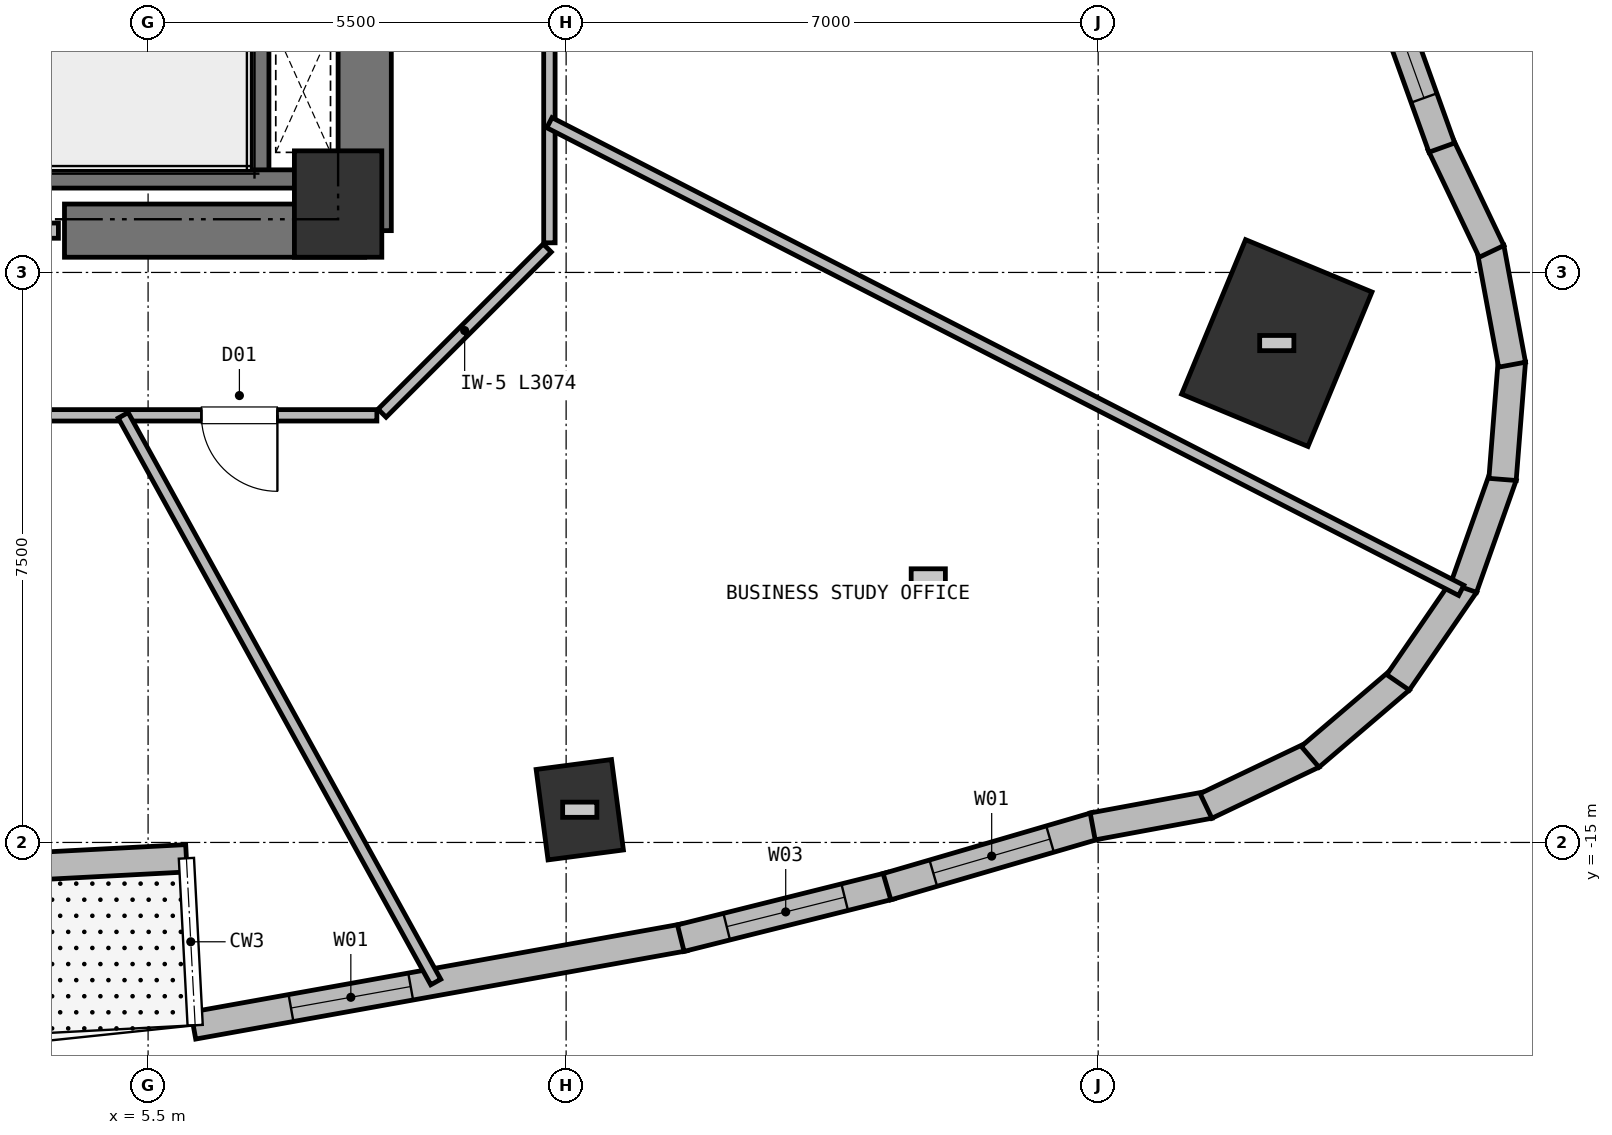
"""IFC4 building model, lengths in metres.
Left out: names, types, materials, properties, quantities, classifications, styles, units other than length and angle.
Written with IfcOpenShell. Run it as: python <this file> out.ifc"""

import sys

from ifc_helpers import new_model, si_unit, direction, frame, frame_2d, origin, origin_2d, place, context, subcontext, project, spatial, rectangle, extrude, element, fill, save


model = new_model("IFC4")
c1 = context("Model", 3, precision=1e-05, world=origin(), true_north=direction((0.0, 1.0)))
c2 = subcontext(c1, "Body", "Model", "MODEL_VIEW")
j1 = project(units=[si_unit("LENGTHUNIT", "METRE"), si_unit("PLANEANGLEUNIT", "RADIAN")], contexts=[c1])
p1 = place(None, origin())
s1 = spatial("IfcSite", under=j1, at=p1, CompositionType="ELEMENT")
p2 = place(p1, origin())
s2 = spatial("IfcBuilding", under=s1, at=p2, CompositionType="ELEMENT")
p3 = place(p2, frame((0.0, 0.0, 41.75)))
s3 = spatial("IfcBuildingStorey", under=s2, at=p3, CompositionType="ELEMENT", Elevation=41.75)
p4 = place(p3, frame((8.0, -6.6, 0.0), z_axis=(0.0, 0.0, 1.0), x_axis=(1.0, 0.0, 0.0)))
e1 = element("IfcColumn", 1, at=p4, inside=s3, PredefinedType="COLUMN", context=c2, shape_type="SweptSolid", body=[
    extrude(rectangle(XDim=1.15, YDim=1.4, at=origin_2d()), origin(), (0.0, 0.0, 1.0), 3.75),
])
p5 = place(p3, frame((4.4, -6.95, 0.0), z_axis=(0.0, 0.0, 1.0), x_axis=(1.0, 0.0, 0.0)))
e2 = element("IfcWall", 2, at=p5, inside=s3, PredefinedType="SHEAR", context=c2, shape_type="SweptSolid", body=[
    extrude(rectangle(XDim=3.95, YDim=0.7, at=frame_2d((1.975, 0.0))), origin(), (0.0, 0.0, 1.0), 3.5),
])
p6 = place(p3, frame((8.35, -6.95, 0.0), z_axis=(0.0, 0.0, 1.0), x_axis=(0.0, 1.0, 0.0)))
e3 = element("IfcWall", 3, at=p6, inside=s3, PredefinedType="SHEAR", context=c2, shape_type="SweptSolid", body=[
    extrude(rectangle(XDim=8.1, YDim=0.7, at=frame_2d((4.05, 0.0))), origin(), (0.0, 0.0, 1.0), 3.5),
])
p7 = place(p3, frame((11.179, -14.569, 0.0), z_axis=(0.0, 0.0, 1.0), x_axis=(0.991444861374, 0.13052619222, 0.0)))
e4 = element("IfcColumn", 4, at=p7, inside=s3, PredefinedType="COLUMN", context=c2, shape_type="SweptSolid", body=[
    extrude(rectangle(XDim=1.0, YDim=1.2, at=origin_2d()), origin(), (0.0, 0.0, 1.0), 3.75),
])
p8 = place(p3, frame((20.35, -8.429, 0.0), z_axis=(0.0, 0.0, 1.0), x_axis=(-0.923879532511, 0.382683432365, 0.0)))
e5 = element("IfcColumn", 5, at=p8, inside=s3, PredefinedType="COLUMN", context=c2, shape_type="SweptSolid", body=[
    extrude(rectangle(XDim=1.8, YDim=2.2, at=origin_2d()), origin(), (0.0, 0.0, 1.0), 3.75),
])
p9 = place(p3, frame((6.004, -15.208, 0.0), z_axis=(0.0, 0.0, 1.0), x_axis=(-0.998630058509, -0.052325961458, 0.0)))
e6 = element("IfcWall", 6, at=p9, inside=s3, PredefinedType="SOLIDWALL", context=c2, shape_type="SweptSolid", body=[
    extrude(rectangle(XDim=10.4, YDim=0.36, at=frame_2d((5.2, 0.0))), origin(), (0.0, 0.0, 1.0), 3.5),
])
p10 = place(p9, frame((5.0, 0.0, 0.0)))
e7 = element("IfcOpeningElement", 7, at=p10, cuts=e6, PredefinedType="OPENING", context=c2, shape_type="SweptSolid", body=[
    extrude(rectangle(XDim=1.65, YDim=2.25, at=frame_2d((0.825, 1.125))), frame((0.0, 0.19, 0.0), z_axis=(0.0, -1.0, 0.0), x_axis=(1.0, 0.0, 0.0)), (0.0, 0.0, 1.0), 0.38),
])
p11 = place(p3, frame((12.557, -16.249, 0.0), z_axis=(0.0, 0.0, 1.0), x_axis=(-0.984232555833, -0.176879269667, 0.0)))
e8 = element("IfcWall", 8, at=p11, inside=s3, PredefinedType="SOLIDWALL", context=c2, shape_type="SweptSolid", body=[
    extrude(rectangle(XDim=6.566, YDim=0.36, at=frame_2d((3.283, 0.0))), origin(), (0.0, 0.0, 1.0), 3.5),
])
p12 = place(p11, frame((3.66, 0.0, 0.72)))
e9 = element("IfcOpeningElement", 9, at=p12, cuts=e8, PredefinedType="OPENING", context=c2, shape_type="SweptSolid", body=[
    extrude(rectangle(XDim=1.6, YDim=1.88, at=frame_2d((0.8, 0.94))), frame((0.0, 0.19, 0.0), z_axis=(0.0, -1.0, 0.0), x_axis=(1.0, 0.0, 0.0)), (0.0, 0.0, 1.0), 0.38),
])
p13 = place(p3, frame((15.27, -15.569, 0.0), z_axis=(0.0, 0.0, 1.0), x_axis=(-0.970177808132, -0.242394349375, 0.0)))
e10 = element("IfcWall", 10, at=p13, inside=s3, PredefinedType="SOLIDWALL", context=c2, shape_type="SweptSolid", body=[
    extrude(rectangle(XDim=2.846, YDim=0.36, at=frame_2d((1.423, 0.0))), origin(), (0.0, 0.0, 1.0), 3.5),
])
p14 = place(p13, frame((0.623, 0.0, 0.72)))
e11 = element("IfcOpeningElement", 11, at=p14, cuts=e10, PredefinedType="OPENING", context=c2, shape_type="SweptSolid", body=[
    extrude(rectangle(XDim=1.6, YDim=1.88, at=frame_2d((0.8, 0.94))), frame((0.0, 0.19, 0.0), z_axis=(0.0, -1.0, 0.0), x_axis=(1.0, 0.0, 0.0)), (0.0, 0.0, 1.0), 0.38),
])
p15 = place(p3, frame((17.977, -14.778, 0.0), z_axis=(0.0, 0.0, 1.0), x_axis=(-0.959918981308, -0.280277629013, 0.0)))
e12 = element("IfcWall", 12, at=p15, inside=s3, PredefinedType="SOLIDWALL", context=c2, shape_type="SweptSolid", body=[
    extrude(rectangle(XDim=2.87, YDim=0.36, at=frame_2d((1.435, 0.0))), origin(), (0.0, 0.0, 1.0), 3.5),
])
p16 = place(p15, frame((0.635, 0.0, 0.72)))
e13 = element("IfcOpeningElement", 13, at=p16, cuts=e12, PredefinedType="OPENING", context=c2, shape_type="SweptSolid", body=[
    extrude(rectangle(XDim=1.6, YDim=1.88, at=frame_2d((0.8, 0.94))), frame((0.0, 0.19, 0.0), z_axis=(0.0, -1.0, 0.0), x_axis=(1.0, 0.0, 0.0)), (0.0, 0.0, 1.0), 0.38),
])
for number, where, z_axis, x_axis in (
    (14, (19.466, -14.504, 0.0), (0.0, 0.0, 1.0), (-0.983, -0.182, 0.0)),
    (15, (20.83, -13.846, 0.0), (0.0, 0.0, 1.0), (-0.903, -0.431, 0.0)),
    (16, (21.978, -12.857, 0.0), (0.0, 0.0, 1.0), (-0.76, -0.649, 0.0)),
):
    element("IfcWall", number, at=place(p3, frame(where, z_axis=z_axis, x_axis=x_axis)), inside=s3, PredefinedType="SOLIDWALL", context=c2, shape_type="SweptSolid", body=[
        extrude(rectangle(XDim=1.564, YDim=0.36, at=frame_2d((0.782, 0.0))), origin(), (0.0, 0.0, 1.0), 3.5),
    ])
for number, where, z_axis, x_axis in (
    (17, (22.831, -11.605, 0.0), (0.0, 0.0, 1.0), (-0.566, -0.824, 0.0)),
    (18, (23.331, -10.175, 0.0), (0.0, 0.0, 1.0), (-0.334, -0.943, 0.0)),
    (19, (23.443, -8.664, 0.0), (0.0, 0.0, 1.0), (-0.079, -0.997, 0.0)),
):
    element("IfcWall", number, at=place(p3, frame(where, z_axis=z_axis, x_axis=x_axis)), inside=s3, PredefinedType="SOLIDWALL", context=c2, shape_type="SweptSolid", body=[
        extrude(rectangle(XDim=1.564, YDim=0.36, at=frame_2d((0.782, 0.0))), origin(), (0.0, 0.0, 1.0), 3.5),
    ])
p17 = place(p3, frame((23.16, -7.176, 0.0), z_axis=(0.0, 0.0, 1.0), x_axis=(0.182318428527, -0.983239538779, 0.0)))
e20 = element("IfcWall", 20, at=p17, inside=s3, PredefinedType="SOLIDWALL", context=c2, shape_type="SweptSolid", body=[
    extrude(rectangle(XDim=1.564, YDim=0.36, at=frame_2d((0.782, 0.0))), origin(), (0.0, 0.0, 1.0), 3.5),
])
p18 = place(p3, frame((22.502, -5.811, 0.0), z_axis=(0.0, 0.0, 1.0), x_axis=(0.430466656099, -0.902606480138, 0.0)))
e21 = element("IfcWall", 21, at=p18, inside=s3, PredefinedType="SOLIDWALL", context=c2, shape_type="SweptSolid", body=[
    extrude(rectangle(XDim=1.564, YDim=0.36, at=frame_2d((0.782, 0.0))), origin(), (0.0, 0.0, 1.0), 3.5),
])
p19 = place(p3, frame((21.511, -3.046, 0.0), z_axis=(0.0, 0.0, 1.0), x_axis=(0.338236051909, -0.941061301504, 0.0)))
e22 = element("IfcWall", 22, at=p19, inside=s3, PredefinedType="SOLIDWALL", context=c2, shape_type="SweptSolid", body=[
    extrude(rectangle(XDim=2.987, YDim=0.36, at=frame_2d((1.493, 0.0))), origin(), (0.0, 0.0, 1.0), 3.5),
])
p20 = place(p19, frame((0.694, 0.0, 0.72)))
e23 = element("IfcOpeningElement", 23, at=p20, cuts=e22, PredefinedType="OPENING", context=c2, shape_type="SweptSolid", body=[
    extrude(rectangle(XDim=1.6, YDim=1.88, at=frame_2d((0.8, 0.94))), frame((0.0, 0.19, 0.0), z_axis=(0.0, -1.0, 0.0), x_axis=(1.0, 0.0, 0.0)), (0.0, 0.0, 1.0), 0.38),
])
p21 = place(p3, frame((6.97, -6.16, 0.0), z_axis=(0.0, 0.0, 1.0), x_axis=(0.0, 1.0, 0.0)))
e24 = element("IfcWall", 24, at=p21, inside=s3, PredefinedType="SHEAR", context=c2, shape_type="SweptSolid", body=[
    extrude(rectangle(XDim=7.22, YDim=0.24, at=frame_2d((3.61, 0.0))), origin(), (0.0, 0.0, 1.0), 3.5),
])
p22 = place(p3, frame((4.01, -6.27, 0.0), z_axis=(0.0, 0.0, 1.0), x_axis=(1.0, 0.0, 0.0)))
e25 = element("IfcWall", 25, at=p22, inside=s3, PredefinedType="SHEAR", context=c2, shape_type="SweptSolid", body=[
    extrude(rectangle(XDim=3.415, YDim=0.24, at=frame_2d((1.708, 0.0))), origin(), (0.0, 0.0, 1.0), 3.5),
])
p23 = place(p3, frame((3.72, -6.95, 0.0), z_axis=(0.0, 0.0, 1.0), x_axis=(1.0, 0.0, 0.0)))
e26 = element("IfcWall", 26, at=p23, inside=s3, PredefinedType="PARTITIONING", context=c2, shape_type="SweptSolid", body=[
    extrude(rectangle(XDim=0.6, YDim=0.2, at=frame_2d((0.3, 0.0))), origin(), (0.0, 0.0, 1.0), 3.5),
])
p24 = place(p3, frame((8.51, -9.38, 0.0), z_axis=(0.0, 0.0, 1.0), x_axis=(-1.0, 0.0, 0.0)))
e27 = element("IfcWall", 27, at=p24, inside=s3, PredefinedType="PARTITIONING", context=c2, shape_type="SweptSolid", body=[
    extrude(rectangle(XDim=17.02, YDim=0.15, at=frame_2d((8.51, 0.0))), origin(), (0.0, 0.0, 1.0), 3.5),
])
p25 = place(p24, frame((7.448, 0.0, 0.0)))
e28 = element("IfcOpeningElement", 28, at=p25, cuts=e27, PredefinedType="OPENING", context=c2, shape_type="SweptSolid", body=[
    extrude(rectangle(XDim=1.0, YDim=2.15, at=frame_2d((0.5, 1.075))), frame((0.0, 0.085, 0.0), z_axis=(0.0, -1.0, 0.0), x_axis=(1.0, 0.0, 0.0)), (0.0, 0.0, 1.0), 0.17),
])
p26 = place(p24, frame((1.309, 0.0, 0.0)))
e29 = element("IfcOpeningElement", 29, at=p26, cuts=e27, PredefinedType="OPENING", context=c2, shape_type="SweptSolid", body=[
    extrude(rectangle(XDim=1.0, YDim=2.15, at=frame_2d((0.5, 1.075))), frame((0.0, 0.085, 0.0), z_axis=(0.0, -1.0, 0.0), x_axis=(1.0, 0.0, 0.0)), (0.0, 0.0, 1.0), 0.17),
])
p27 = place(p24, frame((14.164, 0.0, 0.0)))
e30 = element("IfcOpeningElement", 30, at=p27, cuts=e27, PredefinedType="OPENING", context=c2, shape_type="SweptSolid", body=[
    extrude(rectangle(XDim=1.06, YDim=2.15, at=frame_2d((0.53, 1.075))), frame((0.0, 0.085, 0.0), z_axis=(0.0, -1.0, 0.0), x_axis=(1.0, 0.0, 0.0)), (0.0, 0.0, 1.0), 0.17),
])
p28 = place(p3, frame((10.752, -7.178, 0.0), z_axis=(0.0, 0.0, 1.0), x_axis=(-0.707067066127, -0.707146494016, 0.0)))
e31 = element("IfcWall", 31, at=p28, inside=s3, PredefinedType="PARTITIONING", context=c2, shape_type="SweptSolid", body=[
    extrude(rectangle(XDim=3.074, YDim=0.15, at=frame_2d((1.537, 0.0))), origin(), (0.0, 0.0, 1.0), 3.12),
])
p29 = place(p3, frame((10.78, 7.11, 0.0), z_axis=(0.0, 0.0, 1.0), x_axis=(0.0, -1.0, 0.0)))
e32 = element("IfcWall", 32, at=p29, inside=s3, PredefinedType="PARTITIONING", context=c2, shape_type="SweptSolid", body=[
    extrude(rectangle(XDim=14.22, YDim=0.15, at=frame_2d((7.11, 0.0))), origin(), (0.0, 0.0, 1.0), 3.12),
])
p30 = place(p29, frame((1.159, 0.0, 0.0)))
e33 = element("IfcOpeningElement", 33, at=p30, cuts=e32, PredefinedType="OPENING", context=c2, shape_type="SweptSolid", body=[
    extrude(rectangle(XDim=1.0, YDim=2.15, at=frame_2d((0.5, 1.075))), frame((0.0, 0.085, 0.0), z_axis=(0.0, -1.0, 0.0), x_axis=(1.0, 0.0, 0.0)), (0.0, 0.0, 1.0), 0.17),
])
p31 = place(p29, frame((9.046, 0.0, 0.0)))
e34 = element("IfcOpeningElement", 34, at=p31, cuts=e32, PredefinedType="OPENING", context=c2, shape_type="SweptSolid", body=[
    extrude(rectangle(XDim=1.0, YDim=2.15, at=frame_2d((0.5, 1.075))), frame((0.0, 0.085, 0.0), z_axis=(0.0, -1.0, 0.0), x_axis=(1.0, 0.0, 0.0)), (0.0, 0.0, 1.0), 0.17),
])
p32 = place(p3, frame((5.173, -9.38, 0.0), z_axis=(0.0, 0.0, 1.0), x_axis=(0.482894673272, -0.875678442424, 0.0)))
e35 = element("IfcWall", 35, at=p32, inside=s3, PredefinedType="PARTITIONING", context=c2, shape_type="SweptSolid", body=[
    extrude(rectangle(XDim=8.515, YDim=0.15, at=frame_2d((4.258, 0.0))), origin(), (0.0, 0.0, 1.0), 3.5),
])
p33 = place(p3, frame((10.78, -5.53, 0.0), z_axis=(0.0, 0.0, 1.0), x_axis=(0.889773346048, -0.456402665048, 0.0)))
e36 = element("IfcWall", 36, at=p33, inside=s3, PredefinedType="PARTITIONING", context=c2, shape_type="SweptSolid", body=[
    extrude(rectangle(XDim=13.483, YDim=0.15, at=frame_2d((6.742, 0.0))), origin(), (0.0, 0.0, 1.0), 3.5),
])
p34 = place(p12, origin())
e37 = element("IfcWindow", 37, at=p34, inside=s3, PartitioningType="SINGLE_PANEL", PredefinedType="WINDOW", context=c2, shape_type="SweptSolid", body=[
    extrude(rectangle(XDim=1.6, YDim=1.88, at=frame_2d((0.8, 0.94))), frame((0.0, 0.03, 0.0), z_axis=(0.0, -1.0, 0.0), x_axis=(1.0, 0.0, 0.0)), (0.0, 0.0, 1.0), 0.06),
])
fill(e9, e37)
p35 = place(p14, origin())
e38 = element("IfcWindow", 38, at=p35, inside=s3, PartitioningType="SINGLE_PANEL", PredefinedType="WINDOW", context=c2, shape_type="SweptSolid", body=[
    extrude(rectangle(XDim=1.6, YDim=1.88, at=frame_2d((0.8, 0.94))), frame((0.0, 0.03, 0.0), z_axis=(0.0, -1.0, 0.0), x_axis=(1.0, 0.0, 0.0)), (0.0, 0.0, 1.0), 0.06),
])
fill(e11, e38)
p36 = place(p16, origin())
e39 = element("IfcWindow", 39, at=p36, inside=s3, PartitioningType="SINGLE_PANEL", PredefinedType="WINDOW", context=c2, shape_type="SweptSolid", body=[
    extrude(rectangle(XDim=1.6, YDim=1.88, at=frame_2d((0.8, 0.94))), frame((0.0, 0.03, 0.0), z_axis=(0.0, -1.0, 0.0), x_axis=(1.0, 0.0, 0.0)), (0.0, 0.0, 1.0), 0.06),
])
fill(e13, e39)
p37 = place(p20, origin())
e40 = element("IfcWindow", 40, at=p37, inside=s3, PartitioningType="SINGLE_PANEL", PredefinedType="WINDOW", context=c2, shape_type="SweptSolid", body=[
    extrude(rectangle(XDim=1.6, YDim=1.88, at=frame_2d((0.8, 0.94))), frame((0.0, 0.03, 0.0), z_axis=(0.0, -1.0, 0.0), x_axis=(1.0, 0.0, 0.0)), (0.0, 0.0, 1.0), 0.06),
])
fill(e23, e40)
p38 = place(p26, origin())
e41 = element("IfcDoor", 41, at=p38, inside=s3, OperationType="SINGLE_SWING_LEFT", PredefinedType="DOOR", context=c2, shape_type="SweptSolid", body=[
    extrude(rectangle(XDim=1.0, YDim=2.15, at=frame_2d((0.5, 1.075))), frame((0.0, 0.025, 0.0), z_axis=(0.0, -1.0, 0.0), x_axis=(1.0, 0.0, 0.0)), (0.0, 0.0, 1.0), 0.05),
])
fill(e29, e41)
save(model, sys.argv[1])
